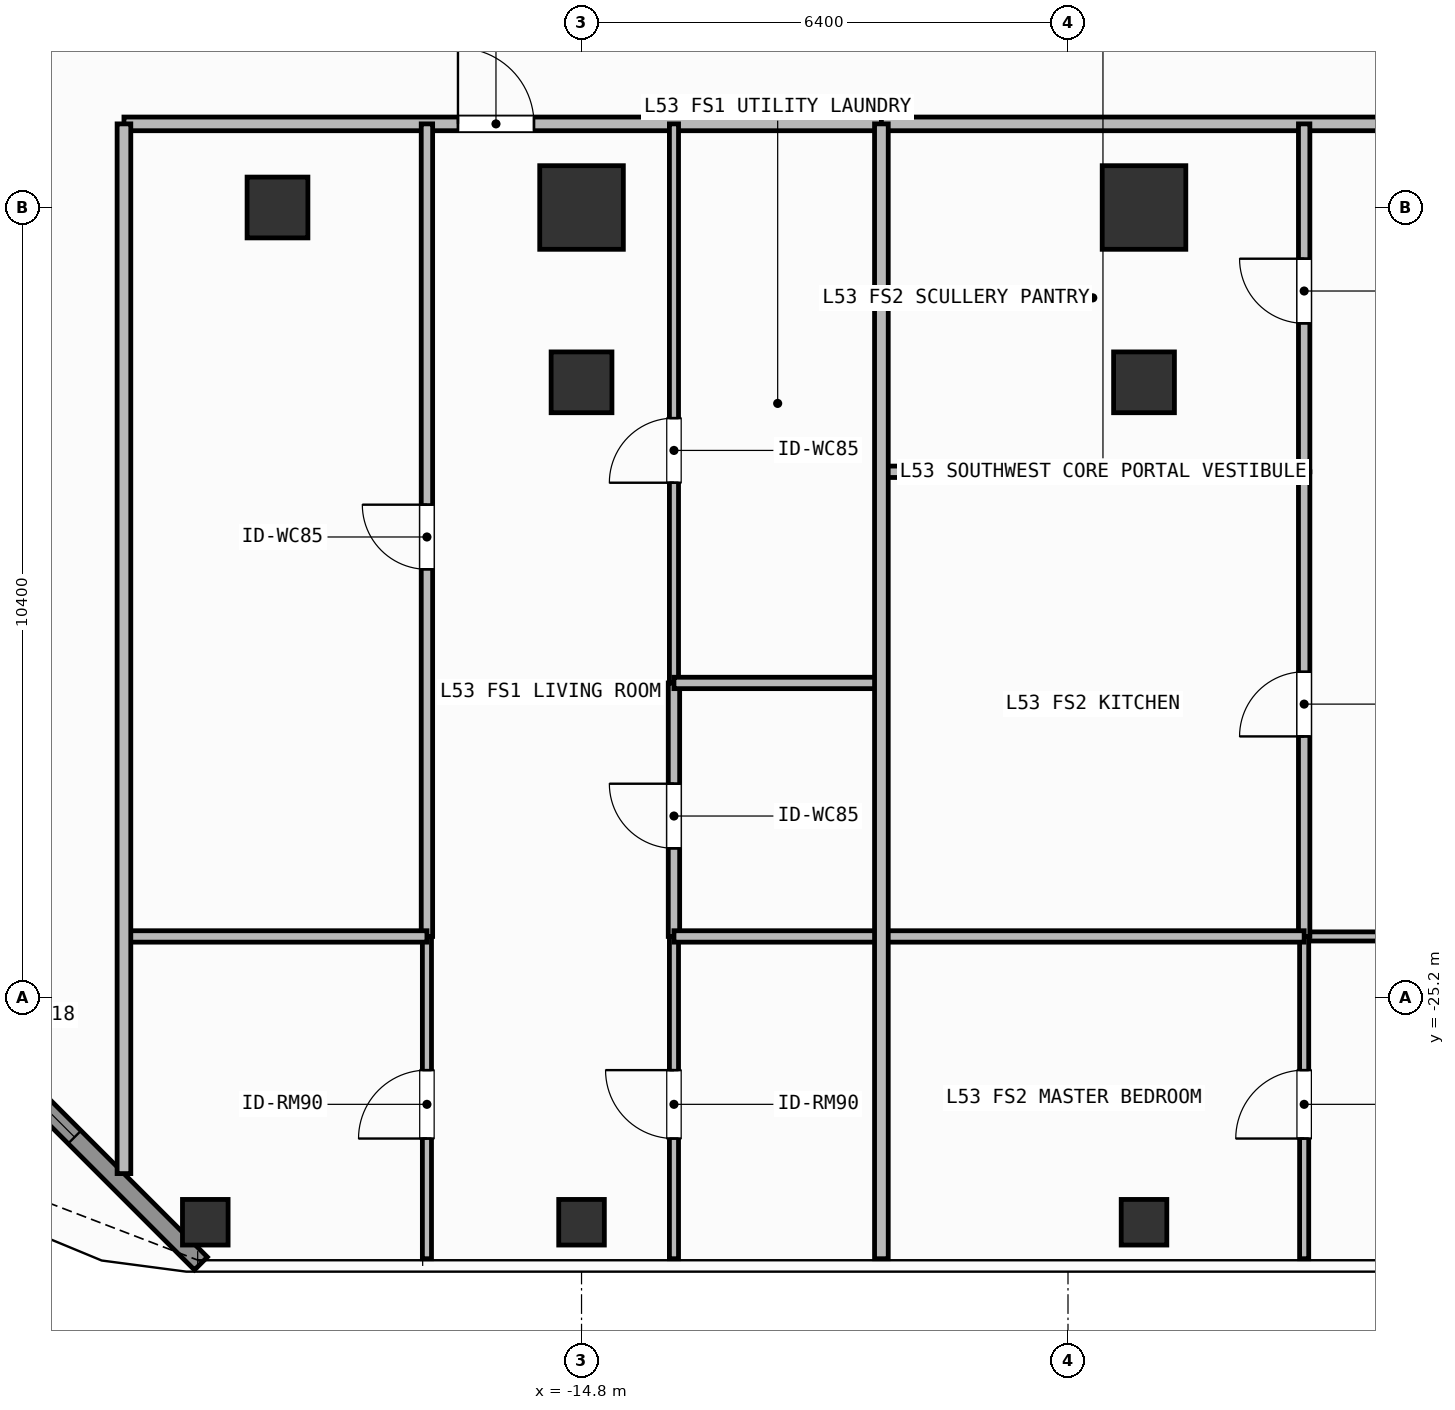
"""IFC4 building model, lengths in metres.
Left out: names, types, materials, properties, quantities, classifications, styles, units other than length and angle.
Written with IfcOpenShell. Run it as: python <this file> out.ifc"""

import sys

from ifc_helpers import new_model, si_unit, direction, frame, frame_2d, origin, origin_2d, place, context, subcontext, project, spatial, rectangle, hollow_rectangle, extrude, element, fill, save


model = new_model("IFC4")
c1 = context("Model", 3, precision=1e-05, world=origin(), true_north=direction((0.0, 1.0)))
c2 = subcontext(c1, "Body", "Model", "MODEL_VIEW")
j1 = project(units=[si_unit("LENGTHUNIT", "METRE"), si_unit("PLANEANGLEUNIT", "RADIAN")], contexts=[c1])
p1 = place(None, origin())
s1 = spatial("IfcSite", under=j1, at=p1, CompositionType="ELEMENT")
p2 = place(p1, origin())
s2 = spatial("IfcBuilding", under=s1, at=p2, CompositionType="ELEMENT")
p3 = place(p2, frame((0.0, 0.0, 215.7)))
s3 = spatial("IfcBuildingStorey", under=s2, at=p3, CompositionType="ELEMENT", Elevation=215.7)
for number, where, z_axis, x_axis in (
    (1, (-14.8, -14.8, 0.0), (0.0, 0.0, 1.0), (1.0, 0.0, 0.0)),
    (2, (-7.4, -14.8, 0.0), (0.0, 0.0, 1.0), (1.0, 0.0, 0.0)),
):
    element("IfcColumn", number, at=place(p3, frame(where, z_axis=z_axis, x_axis=x_axis)), inside=s3, PredefinedType="COLUMN", context=c2, shape_type="SweptSolid", body=[
        extrude(rectangle(XDim=1.1, YDim=1.1, at=origin_2d()), origin(), (0.0, 0.0, 1.0), 3.9),
    ])
for number, where, z_axis, x_axis in (
    (3, (-18.8, -14.8, 0.0), (0.0, 0.0, 1.0), (1.0, 0.0, 0.0)),
    (4, (-14.8, -17.1, 0.0), (0.0, 0.0, 1.0), (1.0, 0.0, 0.0)),
    (5, (-7.4, -17.1, 0.0), (0.0, 0.0, 1.0), (1.0, 0.0, 0.0)),
):
    element("IfcColumn", number, at=place(p3, frame(where, z_axis=z_axis, x_axis=x_axis)), inside=s3, PredefinedType="COLUMN", context=c2, shape_type="SweptSolid", body=[
        extrude(hollow_rectangle(XDim=0.8, YDim=0.8, WallThickness=0.036, at=origin_2d()), origin(), (0.0, 0.0, 1.0), 3.9),
    ])
for number, where, z_axis, x_axis in (
    (6, (-19.75, -28.15, 0.0), (0.0, 0.0, 1.0), (1.0, 0.0, 0.0)),
    (7, (-14.8, -28.15, 0.0), (0.0, 0.0, 1.0), (1.0, 0.0, 0.0)),
    (8, (-7.4, -28.15, 0.0), (0.0, 0.0, 1.0), (1.0, 0.0, 0.0)),
):
    element("IfcColumn", number, at=place(p3, frame(where, z_axis=z_axis, x_axis=x_axis)), inside=s3, PredefinedType="COLUMN", context=c2, shape_type="SweptSolid", body=[
        extrude(hollow_rectangle(XDim=0.6, YDim=0.6, WallThickness=0.028, at=origin_2d()), origin(), (0.0, 0.0, 1.0), 3.9),
    ])
p4 = place(p3, frame((-19.808, -28.692, 0.0), z_axis=(0.0, 0.0, 1.0), x_axis=(-0.707106781187, 0.707106781187, 0.0)))
e9 = element("IfcWall", 9, at=p4, inside=s3, PredefinedType="SOLIDWALL", context=c2, shape_type="SweptSolid", body=[
    extrude(rectangle(XDim=6.201, YDim=0.24, at=frame_2d((3.101, 0.0))), origin(), (0.0, 0.0, 1.0), 3.62),
])
p5 = place(p4, frame((2.351, 0.0, 0.8)))
e10 = element("IfcOpeningElement", 10, at=p5, cuts=e9, PredefinedType="OPENING", context=c2, shape_type="SweptSolid", body=[
    extrude(rectangle(XDim=1.5, YDim=1.85, at=frame_2d((0.75, 0.925))), frame((0.0, 0.13, 0.0), z_axis=(0.0, -1.0, 0.0), x_axis=(1.0, 0.0, 0.0)), (0.0, 0.0, 1.0), 0.26),
])
p6 = place(p3, frame((-20.82, -13.7, 0.0), z_axis=(0.0, 0.0, 1.0), x_axis=(1.0, 0.0, 0.0)))
e11 = element("IfcWall", 11, at=p6, inside=s3, PredefinedType="PARTITIONING", context=c2, shape_type="SweptSolid", body=[
    extrude(rectangle(XDim=9.965, YDim=0.18, at=frame_2d((4.982, 0.0))), origin(), (0.0, 0.0, 1.0), 3.62),
])
p7 = place(p6, frame((4.394, 0.0, 0.0)))
e12 = element("IfcOpeningElement", 12, at=p7, cuts=e11, PredefinedType="OPENING", context=c2, shape_type="SweptSolid", body=[
    extrude(rectangle(XDim=1.0, YDim=2.2, at=frame_2d((0.5, 1.1))), frame((0.0, 0.1, 0.0), z_axis=(0.0, -1.0, 0.0), x_axis=(1.0, 0.0, 0.0)), (0.0, 0.0, 1.0), 0.2),
])
p8 = place(p3, frame((-16.834, -24.39, 0.0), z_axis=(0.0, 0.0, 1.0), x_axis=(0.0, 1.0, 0.0)))
e13 = element("IfcWall", 13, at=p8, inside=s3, PredefinedType="PARTITIONING", context=c2, shape_type="SweptSolid", body=[
    extrude(rectangle(XDim=10.69, YDim=0.15, at=frame_2d((5.345, 0.0))), origin(), (0.0, 0.0, 1.0), 3.62),
])
p9 = place(p8, frame((4.83, 0.0, 0.0)))
e14 = element("IfcOpeningElement", 14, at=p9, cuts=e13, PredefinedType="OPENING", context=c2, shape_type="SweptSolid", body=[
    extrude(rectangle(XDim=0.85, YDim=2.1, at=frame_2d((0.425, 1.05))), frame((0.0, 0.085, 0.0), z_axis=(0.0, -1.0, 0.0), x_axis=(1.0, 0.0, 0.0)), (0.0, 0.0, 1.0), 0.17),
])
p10 = place(p3, frame((-16.834, -28.63, 0.0), z_axis=(0.0, 0.0, 1.0), x_axis=(0.0, 1.0, 0.0)))
e15 = element("IfcWall", 15, at=p10, inside=s3, PredefinedType="PARTITIONING", context=c2, shape_type="SweptSolid", body=[
    extrude(rectangle(XDim=4.24, YDim=0.12, at=frame_2d((2.12, 0.0))), origin(), (0.0, 0.0, 1.0), 3.62),
])
p11 = place(p10, frame((1.581, 0.0, 0.0)))
e16 = element("IfcOpeningElement", 16, at=p11, cuts=e15, PredefinedType="OPENING", context=c2, shape_type="SweptSolid", body=[
    extrude(rectangle(XDim=0.9, YDim=2.1, at=frame_2d((0.45, 1.05))), frame((0.0, 0.07, 0.0), z_axis=(0.0, -1.0, 0.0), x_axis=(1.0, 0.0, 0.0)), (0.0, 0.0, 1.0), 0.14),
])
p12 = place(p3, frame((-13.584, -24.39, 0.0), z_axis=(0.0, 0.0, 1.0), x_axis=(0.0, 1.0, 0.0)))
e17 = element("IfcWall", 17, at=p12, inside=s3, PredefinedType="PARTITIONING", context=c2, shape_type="SweptSolid", body=[
    extrude(rectangle(XDim=3.335, YDim=0.15, at=frame_2d((1.667, 0.0))), origin(), (0.0, 0.0, 1.0), 3.62),
])
p13 = place(p12, frame((1.159, 0.0, 0.0)))
e18 = element("IfcOpeningElement", 18, at=p13, cuts=e17, PredefinedType="OPENING", context=c2, shape_type="SweptSolid", body=[
    extrude(rectangle(XDim=0.85, YDim=2.1, at=frame_2d((0.425, 1.05))), frame((0.0, 0.085, 0.0), z_axis=(0.0, -1.0, 0.0), x_axis=(1.0, 0.0, 0.0)), (0.0, 0.0, 1.0), 0.17),
])
p14 = place(p3, frame((-13.584, -21.055, 0.0), z_axis=(0.0, 0.0, 1.0), x_axis=(0.0, 1.0, 0.0)))
e19 = element("IfcWall", 19, at=p14, inside=s3, PredefinedType="PARTITIONING", context=c2, shape_type="SweptSolid", body=[
    extrude(rectangle(XDim=7.355, YDim=0.12, at=frame_2d((3.677, 0.0))), origin(), (0.0, 0.0, 1.0), 3.62),
])
p15 = place(p14, frame((2.634, 0.0, 0.0)))
e20 = element("IfcOpeningElement", 20, at=p15, cuts=e19, PredefinedType="OPENING", context=c2, shape_type="SweptSolid", body=[
    extrude(rectangle(XDim=0.85, YDim=2.1, at=frame_2d((0.425, 1.05))), frame((0.0, 0.07, 0.0), z_axis=(0.0, -1.0, 0.0), x_axis=(1.0, 0.0, 0.0)), (0.0, 0.0, 1.0), 0.14),
])
p16 = place(p3, frame((-13.584, -28.63, 0.0), z_axis=(0.0, 0.0, 1.0), x_axis=(0.0, 1.0, 0.0)))
e21 = element("IfcWall", 21, at=p16, inside=s3, PredefinedType="PARTITIONING", context=c2, shape_type="SweptSolid", body=[
    extrude(rectangle(XDim=4.24, YDim=0.12, at=frame_2d((2.12, 0.0))), origin(), (0.0, 0.0, 1.0), 3.62),
])
p17 = place(p16, frame((1.581, 0.0, 0.0)))
e22 = element("IfcOpeningElement", 22, at=p17, cuts=e21, PredefinedType="OPENING", context=c2, shape_type="SweptSolid", body=[
    extrude(rectangle(XDim=0.9, YDim=2.1, at=frame_2d((0.45, 1.05))), frame((0.0, 0.07, 0.0), z_axis=(0.0, -1.0, 0.0), x_axis=(1.0, 0.0, 0.0)), (0.0, 0.0, 1.0), 0.14),
])
p18 = place(p3, frame((-10.855, -13.7, 0.0), z_axis=(0.0, 0.0, 1.0), x_axis=(1.0, 0.0, 0.0)))
e23 = element("IfcWall", 23, at=p18, inside=s3, PredefinedType="PARTITIONING", context=c2, shape_type="SweptSolid", body=[
    extrude(rectangle(XDim=16.454, YDim=0.18, at=frame_2d((8.227, 0.0))), origin(), (0.0, 0.0, 1.0), 3.62),
])
p19 = place(p18, frame((8.528, 0.0, 0.0)))
e24 = element("IfcOpeningElement", 24, at=p19, cuts=e23, PredefinedType="OPENING", context=c2, shape_type="SweptSolid", body=[
    extrude(rectangle(XDim=1.0, YDim=2.2, at=frame_2d((0.5, 1.1))), frame((0.0, 0.1, 0.0), z_axis=(0.0, -1.0, 0.0), x_axis=(1.0, 0.0, 0.0)), (0.0, 0.0, 1.0), 0.2),
])
p20 = place(p3, frame((-5.293, -24.39, 0.0), z_axis=(0.0, 0.0, 1.0), x_axis=(1.0, 0.0, 0.0)))
e25 = element("IfcWall", 25, at=p20, inside=s3, PredefinedType="PARTITIONING", context=c2, shape_type="SweptSolid", body=[
    extrude(rectangle(XDim=7.248, YDim=0.12, at=frame_2d((3.624, 0.0))), origin(), (0.0, 0.0, 1.0), 3.62),
])
p21 = place(p20, frame((3.174, 0.0, 0.0)))
e26 = element("IfcOpeningElement", 26, at=p21, cuts=e25, PredefinedType="OPENING", context=c2, shape_type="SweptSolid", body=[
    extrude(rectangle(XDim=0.9, YDim=2.1, at=frame_2d((0.45, 1.05))), frame((0.0, 0.07, 0.0), z_axis=(0.0, -1.0, 0.0), x_axis=(1.0, 0.0, 0.0)), (0.0, 0.0, 1.0), 0.14),
])
p22 = place(p3, frame((-5.293, -24.39, 0.0), z_axis=(0.0, 0.0, 1.0), x_axis=(0.0, 1.0, 0.0)))
e27 = element("IfcWall", 27, at=p22, inside=s3, PredefinedType="PARTITIONING", context=c2, shape_type="SweptSolid", body=[
    extrude(rectangle(XDim=6.113, YDim=0.15, at=frame_2d((3.056, 0.0))), origin(), (0.0, 0.0, 1.0), 3.62),
])
p23 = place(p22, frame((2.632, 0.0, 0.0)))
e28 = element("IfcOpeningElement", 28, at=p23, cuts=e27, PredefinedType="OPENING", context=c2, shape_type="SweptSolid", body=[
    extrude(rectangle(XDim=0.85, YDim=2.1, at=frame_2d((0.425, 1.05))), frame((0.0, 0.085, 0.0), z_axis=(0.0, -1.0, 0.0), x_axis=(1.0, 0.0, 0.0)), (0.0, 0.0, 1.0), 0.17),
])
p24 = place(p3, frame((-5.293, -18.277, 0.0), z_axis=(0.0, 0.0, 1.0), x_axis=(0.0, 1.0, 0.0)))
e29 = element("IfcWall", 29, at=p24, inside=s3, PredefinedType="PARTITIONING", context=c2, shape_type="SweptSolid", body=[
    extrude(rectangle(XDim=4.577, YDim=0.15, at=frame_2d((2.289, 0.0))), origin(), (0.0, 0.0, 1.0), 3.62),
])
p25 = place(p24, frame((1.953, 0.0, 0.0)))
e30 = element("IfcOpeningElement", 30, at=p25, cuts=e29, PredefinedType="OPENING", context=c2, shape_type="SweptSolid", body=[
    extrude(rectangle(XDim=0.85, YDim=2.1, at=frame_2d((0.425, 1.05))), frame((0.0, 0.085, 0.0), z_axis=(0.0, -1.0, 0.0), x_axis=(1.0, 0.0, 0.0)), (0.0, 0.0, 1.0), 0.17),
])
p26 = place(p3, frame((-5.293, -28.63, 0.0), z_axis=(0.0, 0.0, 1.0), x_axis=(0.0, 1.0, 0.0)))
e31 = element("IfcWall", 31, at=p26, inside=s3, PredefinedType="PARTITIONING", context=c2, shape_type="SweptSolid", body=[
    extrude(rectangle(XDim=4.24, YDim=0.12, at=frame_2d((2.12, 0.0))), origin(), (0.0, 0.0, 1.0), 3.62),
])
p27 = place(p26, frame((1.581, 0.0, 0.0)))
e32 = element("IfcOpeningElement", 32, at=p27, cuts=e31, PredefinedType="OPENING", context=c2, shape_type="SweptSolid", body=[
    extrude(rectangle(XDim=0.9, YDim=2.1, at=frame_2d((0.45, 1.05))), frame((0.0, 0.07, 0.0), z_axis=(0.0, -1.0, 0.0), x_axis=(1.0, 0.0, 0.0)), (0.0, 0.0, 1.0), 0.14),
])
p28 = place(p3, frame((-20.82, -24.39, 0.0), z_axis=(0.0, 0.0, 1.0), x_axis=(1.0, 0.0, 0.0)))
e33 = element("IfcWall", 33, at=p28, inside=s3, PredefinedType="PARTITIONING", context=c2, shape_type="SweptSolid", body=[
    extrude(rectangle(XDim=3.986, YDim=0.15, at=frame_2d((1.993, 0.0))), origin(), (0.0, 0.0, 1.0), 3.62),
])
for number, where, z_axis, x_axis in (
    (34, (-13.584, -21.055, 0.0), (0.0, 0.0, 1.0), (1.0, 0.0, 0.0)),
    (35, (-13.584, -24.39, 0.0), (0.0, 0.0, 1.0), (1.0, 0.0, 0.0)),
):
    element("IfcWall", number, at=place(p3, frame(where, z_axis=z_axis, x_axis=x_axis)), inside=s3, PredefinedType="PARTITIONING", context=c2, shape_type="SweptSolid", body=[
        extrude(rectangle(XDim=2.729, YDim=0.15, at=frame_2d((1.365, 0.0))), origin(), (0.0, 0.0, 1.0), 3.62),
    ])
for number, where, z_axis, x_axis in (
    (36, (-10.855, -18.277, 0.0), (0.0, 0.0, 1.0), (1.0, 0.0, 0.0)),
    (37, (-10.855, -24.39, 0.0), (0.0, 0.0, 1.0), (1.0, 0.0, 0.0)),
):
    element("IfcWall", number, at=place(p3, frame(where, z_axis=z_axis, x_axis=x_axis)), inside=s3, PredefinedType="PARTITIONING", context=c2, shape_type="SweptSolid", body=[
        extrude(rectangle(XDim=5.562, YDim=0.15, at=frame_2d((2.781, 0.0))), origin(), (0.0, 0.0, 1.0), 3.62),
    ])
p29 = place(p3, frame((-10.855, -28.63, 0.0), z_axis=(0.0, 0.0, 1.0), x_axis=(0.0, 1.0, 0.0)))
e38 = element("IfcWall", 38, at=p29, inside=s3, PredefinedType="PARTITIONING", context=c2, shape_type="SweptSolid", body=[
    extrude(rectangle(XDim=14.93, YDim=0.18, at=frame_2d((7.465, 0.0))), origin(), (0.0, 0.0, 1.0), 3.62),
])
p30 = place(p3, frame((-20.82, -27.51, 0.0), z_axis=(0.0, 0.0, 1.0), x_axis=(0.0, 1.0, 0.0)))
e39 = element("IfcWall", 39, at=p30, inside=s3, PredefinedType="PARTITIONING", context=c2, shape_type="SweptSolid", body=[
    extrude(rectangle(XDim=13.81, YDim=0.18, at=frame_2d((6.905, 0.0))), origin(), (0.0, 0.0, 1.0), 3.62),
])
p31 = place(p5, origin())
e40 = element("IfcWindow", 40, at=p31, inside=s3, PartitioningType="SINGLE_PANEL", PredefinedType="WINDOW", context=c2, shape_type="SweptSolid", body=[
    extrude(rectangle(XDim=1.5, YDim=1.85, at=frame_2d((0.75, 0.925))), frame((0.0, 0.03, 0.0), z_axis=(0.0, -1.0, 0.0), x_axis=(1.0, 0.0, 0.0)), (0.0, 0.0, 1.0), 0.06),
])
fill(e10, e40)
p32 = place(p7, origin())
e41 = element("IfcDoor", 41, at=p32, inside=s3, OperationType="SINGLE_SWING_LEFT", PredefinedType="DOOR", context=c2, shape_type="SweptSolid", body=[
    extrude(rectangle(XDim=1.0, YDim=2.2, at=frame_2d((0.5, 1.1))), frame((0.0, 0.025, 0.0), z_axis=(0.0, -1.0, 0.0), x_axis=(1.0, 0.0, 0.0)), (0.0, 0.0, 1.0), 0.05),
])
fill(e12, e41)
p33 = place(p9, origin())
e42 = element("IfcDoor", 42, at=p33, inside=s3, OperationType="SINGLE_SWING_RIGHT", PredefinedType="DOOR", context=c2, shape_type="SweptSolid", body=[
    extrude(rectangle(XDim=0.85, YDim=2.1, at=frame_2d((0.425, 1.05))), frame((0.0, 0.025, 0.0), z_axis=(0.0, -1.0, 0.0), x_axis=(1.0, 0.0, 0.0)), (0.0, 0.0, 1.0), 0.05),
])
fill(e14, e42)
p34 = place(p11, origin())
e43 = element("IfcDoor", 43, at=p34, inside=s3, OperationType="SINGLE_SWING_LEFT", PredefinedType="DOOR", context=c2, shape_type="SweptSolid", body=[
    extrude(rectangle(XDim=0.9, YDim=2.1, at=frame_2d((0.45, 1.05))), frame((0.0, 0.025, 0.0), z_axis=(0.0, -1.0, 0.0), x_axis=(1.0, 0.0, 0.0)), (0.0, 0.0, 1.0), 0.05),
])
fill(e16, e43)
p35 = place(p13, origin())
e44 = element("IfcDoor", 44, at=p35, inside=s3, OperationType="SINGLE_SWING_RIGHT", PredefinedType="DOOR", context=c2, shape_type="SweptSolid", body=[
    extrude(rectangle(XDim=0.85, YDim=2.1, at=frame_2d((0.425, 1.05))), frame((0.0, 0.025, 0.0), z_axis=(0.0, -1.0, 0.0), x_axis=(1.0, 0.0, 0.0)), (0.0, 0.0, 1.0), 0.05),
])
fill(e18, e44)
p36 = place(p15, origin())
e45 = element("IfcDoor", 45, at=p36, inside=s3, OperationType="SINGLE_SWING_LEFT", PredefinedType="DOOR", context=c2, shape_type="SweptSolid", body=[
    extrude(rectangle(XDim=0.85, YDim=2.1, at=frame_2d((0.425, 1.05))), frame((0.0, 0.025, 0.0), z_axis=(0.0, -1.0, 0.0), x_axis=(1.0, 0.0, 0.0)), (0.0, 0.0, 1.0), 0.05),
])
fill(e20, e45)
p37 = place(p17, origin())
e46 = element("IfcDoor", 46, at=p37, inside=s3, OperationType="SINGLE_SWING_RIGHT", PredefinedType="DOOR", context=c2, shape_type="SweptSolid", body=[
    extrude(rectangle(XDim=0.9, YDim=2.1, at=frame_2d((0.45, 1.05))), frame((0.0, 0.025, 0.0), z_axis=(0.0, -1.0, 0.0), x_axis=(1.0, 0.0, 0.0)), (0.0, 0.0, 1.0), 0.05),
])
fill(e22, e46)
p38 = place(p23, origin())
e47 = element("IfcDoor", 47, at=p38, inside=s3, OperationType="SINGLE_SWING_LEFT", PredefinedType="DOOR", context=c2, shape_type="SweptSolid", body=[
    extrude(rectangle(XDim=0.85, YDim=2.1, at=frame_2d((0.425, 1.05))), frame((0.0, 0.025, 0.0), z_axis=(0.0, -1.0, 0.0), x_axis=(1.0, 0.0, 0.0)), (0.0, 0.0, 1.0), 0.05),
])
fill(e28, e47)
p39 = place(p25, origin())
e48 = element("IfcDoor", 48, at=p39, inside=s3, OperationType="SINGLE_SWING_RIGHT", PredefinedType="DOOR", context=c2, shape_type="SweptSolid", body=[
    extrude(rectangle(XDim=0.85, YDim=2.1, at=frame_2d((0.425, 1.05))), frame((0.0, 0.025, 0.0), z_axis=(0.0, -1.0, 0.0), x_axis=(1.0, 0.0, 0.0)), (0.0, 0.0, 1.0), 0.05),
])
fill(e30, e48)
p40 = place(p27, origin())
e49 = element("IfcDoor", 49, at=p40, inside=s3, OperationType="SINGLE_SWING_LEFT", PredefinedType="DOOR", context=c2, shape_type="SweptSolid", body=[
    extrude(rectangle(XDim=0.9, YDim=2.1, at=frame_2d((0.45, 1.05))), frame((0.0, 0.025, 0.0), z_axis=(0.0, -1.0, 0.0), x_axis=(1.0, 0.0, 0.0)), (0.0, 0.0, 1.0), 0.05),
])
fill(e32, e49)
save(model, sys.argv[1])
